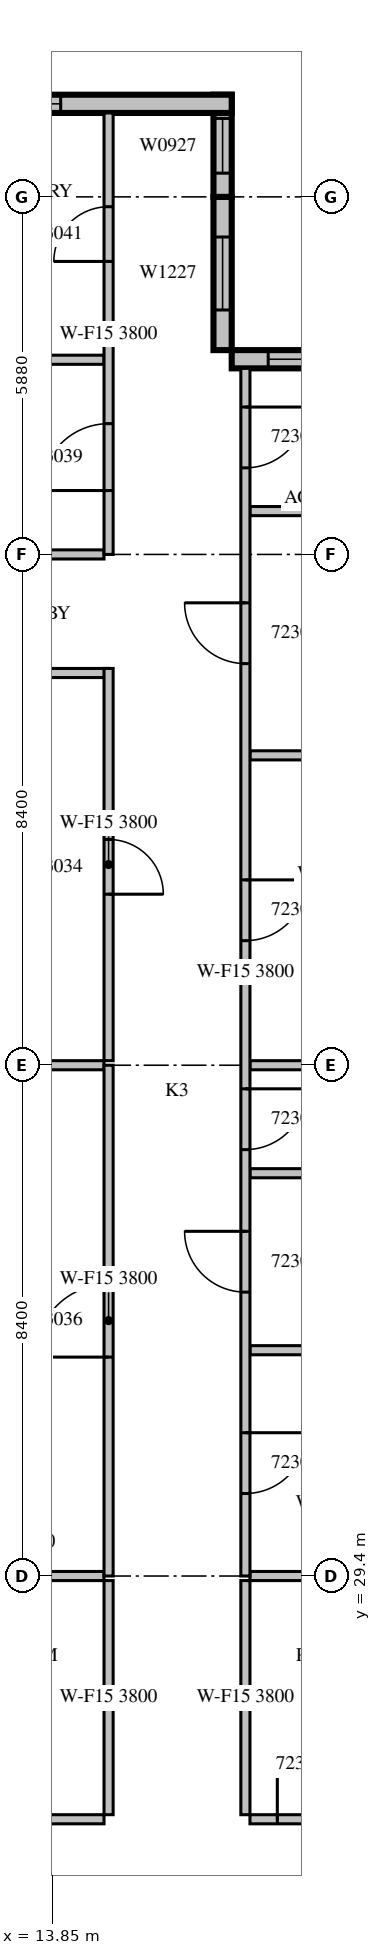
"""IFC4 building model, lengths in metres.
Left out: names, types, materials, properties, quantities, classifications, styles, units other than length and angle.
Written with IfcOpenShell. Run it as: python <this file> out.ifc"""

import sys

from ifc_helpers import new_model, si_unit, direction, frame, frame_2d, origin, place, context, subcontext, project, spatial, rectangle, extrude, source, transform, mapped, element, fill, save


model = new_model("IFC4")
c1 = context("Model", 3, precision=1e-05, world=origin(), true_north=direction((0.0, 1.0)))
c2 = subcontext(c1, "Body", "Model", "MODEL_VIEW")
j1 = project(units=[si_unit("LENGTHUNIT", "METRE"), si_unit("PLANEANGLEUNIT", "RADIAN")], contexts=[c1])
p1 = place(None, origin())
s1 = spatial("IfcSite", under=j1, at=p1, CompositionType="ELEMENT")
p2 = place(p1, origin())
s2 = spatial("IfcBuilding", under=s1, at=p2, CompositionType="ELEMENT")
p3 = place(p2, frame((0.0, 0.0, 107.7)))
s3 = spatial("IfcBuildingStorey", under=s2, at=p3, CompositionType="ELEMENT", Elevation=107.7)
m1 = source(origin(), c2, "Body", "SweptSolid", [
    extrude(rectangle(XDim=4.2, YDim=0.3, at=frame_2d((2.1, 0.0))), origin(), (0.0, 0.0, 1.0), 3.8),
])
p4 = place(p3, frame((21.0, 49.41, 0.0), z_axis=(0.0, 0.0, 1.0), x_axis=(-1.0, 0.0, 0.0)))
e1 = element("IfcWall", 1, at=p4, inside=s3, PredefinedType="STANDARD", context=c2, shape_type="MappedRepresentation", body=[
    mapped(m1, transform((0.0, 0.0, 0.0), scale=1.0)),
])
m2 = source(origin(), c2, "Body", "SweptSolid", [
    extrude(rectangle(XDim=3.0, YDim=2.7, at=frame_2d((1.5, 1.35))), frame((0.0, 0.16, 0.0), z_axis=(0.0, -1.0, 0.0), x_axis=(1.0, 0.0, 0.0)), (0.0, 0.0, 1.0), 0.32),
])
p5 = place(p4, frame((0.6, 0.0, 0.6)))
e2 = element("IfcOpeningElement", 2, at=p5, cuts=e1, PredefinedType="OPENING", context=c2, shape_type="MappedRepresentation", body=[
    mapped(m2, transform((0.0, 0.0, 0.0), scale=1.0)),
])
m3 = source(origin(), c2, "Body", "SweptSolid", [
    extrude(rectangle(XDim=2.52, YDim=0.3, at=frame_2d((1.26, 0.0))), origin(), (0.0, 0.0, 1.0), 3.8),
])
p6 = place(p3, frame((16.65, 49.56, 0.0), z_axis=(0.0, 0.0, 1.0), x_axis=(0.0, 1.0, 0.0)))
e3 = element("IfcWall", 3, at=p6, inside=s3, PredefinedType="STANDARD", context=c2, shape_type="MappedRepresentation", body=[
    mapped(m3, transform((0.0, 0.0, 0.0), scale=1.0)),
])
m4 = source(origin(), c2, "Body", "SweptSolid", [
    extrude(rectangle(XDim=1.2, YDim=2.7, at=frame_2d((0.6, 1.35))), frame((0.0, 0.16, 0.0), z_axis=(0.0, -1.0, 0.0), x_axis=(1.0, 0.0, 0.0)), (0.0, 0.0, 1.0), 0.32),
])
p7 = place(p6, frame((0.66, 0.0, 0.6)))
e4 = element("IfcOpeningElement", 4, at=p7, cuts=e3, PredefinedType="OPENING", context=c2, shape_type="MappedRepresentation", body=[
    mapped(m4, transform((0.0, 0.0, 0.0), scale=1.0)),
])
m5 = source(origin(), c2, "Body", "SweptSolid", [
    extrude(rectangle(XDim=1.68, YDim=0.3, at=frame_2d((0.84, 0.0))), origin(), (0.0, 0.0, 1.0), 3.8),
])
p8 = place(p3, frame((16.65, 52.08, 0.0), z_axis=(0.0, 0.0, 1.0), x_axis=(0.0, 1.0, 0.0)))
e5 = element("IfcWall", 5, at=p8, inside=s3, PredefinedType="STANDARD", context=c2, shape_type="MappedRepresentation", body=[
    mapped(m5, transform((0.0, 0.0, 0.0), scale=1.0)),
])
m6 = source(origin(), c2, "Body", "SweptSolid", [
    extrude(rectangle(XDim=0.9, YDim=2.7, at=frame_2d((0.45, 1.35))), frame((0.0, 0.16, 0.0), z_axis=(0.0, -1.0, 0.0), x_axis=(1.0, 0.0, 0.0)), (0.0, 0.0, 1.0), 0.32),
])
p9 = place(p8, frame((0.39, 0.0, 0.6)))
e6 = element("IfcOpeningElement", 6, at=p9, cuts=e5, PredefinedType="OPENING", context=c2, shape_type="MappedRepresentation", body=[
    mapped(m6, transform((0.0, 0.0, 0.0), scale=1.0)),
])
m7 = source(origin(), c2, "Body", "SweptSolid", [
    extrude(rectangle(XDim=10.5, YDim=0.3, at=frame_2d((5.25, 0.0))), origin(), (0.0, 0.0, 1.0), 3.8),
])
p10 = place(p3, frame((16.8, 53.61, 0.0), z_axis=(0.0, 0.0, 1.0), x_axis=(-1.0, 0.0, 0.0)))
e7 = element("IfcWall", 7, at=p10, inside=s3, PredefinedType="STANDARD", context=c2, shape_type="MappedRepresentation", body=[
    mapped(m7, transform((0.0, 0.0, 0.0), scale=1.0)),
])
m8 = source(origin(), c2, "Body", "SweptSolid", [
    extrude(rectangle(XDim=1.8, YDim=2.7, at=frame_2d((0.9, 1.35))), frame((0.0, 0.16, 0.0), z_axis=(0.0, -1.0, 0.0), x_axis=(1.0, 0.0, 0.0)), (0.0, 0.0, 1.0), 0.32),
])
p11 = place(p10, frame((8.025, 0.0, 0.6)))
e8 = element("IfcOpeningElement", 8, at=p11, cuts=e7, PredefinedType="OPENING", context=c2, shape_type="MappedRepresentation", body=[
    mapped(m8, transform((0.0, 0.0, 0.0), scale=1.0)),
])
m9 = source(origin(), c2, "Body", "SweptSolid", [
    extrude(rectangle(XDim=2.4, YDim=2.7, at=frame_2d((1.2, 1.35))), frame((0.0, 0.16, 0.0), z_axis=(0.0, -1.0, 0.0), x_axis=(1.0, 0.0, 0.0)), (0.0, 0.0, 1.0), 0.32),
])
p12 = place(p10, frame((2.812, 0.0, 0.6)))
e9 = element("IfcOpeningElement", 9, at=p12, cuts=e7, PredefinedType="OPENING", context=c2, shape_type="MappedRepresentation", body=[
    mapped(m9, transform((0.0, 0.0, 0.0), scale=1.0)),
])
p13 = place(p3, frame((6.505, 25.4, 0.0), z_axis=(0.0, 0.0, 1.0), x_axis=(1.0, 0.0, 0.0)))
e10 = element("IfcWall", 10, at=p13, inside=s3, PredefinedType="PARTITIONING", context=c2, shape_type="SweptSolid", body=[
    extrude(rectangle(XDim=8.195, YDim=0.15, at=frame_2d((4.098, 0.0))), origin(), (0.0, 0.0, 1.0), 3.8),
])
m10 = source(origin(), c2, "Body", "SweptSolid", [
    extrude(rectangle(XDim=0.9, YDim=2.1, at=frame_2d((0.45, 1.05))), frame((0.0, 0.085, 0.0), z_axis=(0.0, -1.0, 0.0), x_axis=(1.0, 0.0, 0.0)), (0.0, 0.0, 1.0), 0.17),
])
p14 = place(p13, frame((1.045, 0.0, 0.0)))
e11 = element("IfcOpeningElement", 11, at=p14, cuts=e10, PredefinedType="OPENING", context=c2, shape_type="MappedRepresentation", body=[
    mapped(m10, transform((0.0, 0.0, 0.0), scale=1.0)),
])
p15 = place(p13, frame((5.97, 0.0, 0.0)))
e12 = element("IfcOpeningElement", 12, at=p15, cuts=e10, PredefinedType="OPENING", context=c2, shape_type="MappedRepresentation", body=[
    mapped(m10, transform((0.0, 0.0, 0.0), scale=1.0)),
])
m11 = source(origin(), c2, "Body", "SweptSolid", [
    extrude(rectangle(XDim=3.6, YDim=0.15, at=frame_2d((1.8, 0.0))), origin(), (0.0, 0.0, 1.0), 3.8),
])
p16 = place(p3, frame((17.1, 25.4, 0.0), z_axis=(0.0, 0.0, 1.0), x_axis=(1.0, 0.0, 0.0)))
e13 = element("IfcWall", 13, at=p16, inside=s3, PredefinedType="PARTITIONING", context=c2, shape_type="MappedRepresentation", body=[
    mapped(m11, transform((0.0, 0.0, 0.0), scale=1.0)),
])
p17 = place(p16, frame((0.45, 0.0, 0.0)))
e14 = element("IfcOpeningElement", 14, at=p17, cuts=e13, PredefinedType="OPENING", context=c2, shape_type="MappedRepresentation", body=[
    mapped(m10, transform((0.0, 0.0, 0.0), scale=1.0)),
])
m12 = source(origin(), c2, "Body", "SweptSolid", [
    extrude(rectangle(XDim=3.85, YDim=0.15, at=frame_2d((1.925, 0.0))), origin(), (0.0, 0.0, 1.0), 3.8),
])
for number, where, z_axis, x_axis in (
    (15, (14.775, 25.475, 0.0), (0.0, 0.0, 1.0), (0.0, 1.0, 0.0)),
    (16, (17.025, 29.325, 0.0), (0.0, 0.0, 1.0), (0.0, -1.0, 0.0)),
):
    element("IfcWall", number, at=place(p3, frame(where, z_axis=z_axis, x_axis=x_axis)), inside=s3, PredefinedType="PARTITIONING", context=c2, shape_type="MappedRepresentation", body=[
        mapped(m12, transform((0.0, 0.0, 0.0), scale=1.0)),
    ])
m13 = source(origin(), c2, "Body", "SweptSolid", [
    extrude(rectangle(XDim=3.676, YDim=0.15, at=frame_2d((1.838, 0.0))), origin(), (0.0, 0.0, 1.0), 3.8),
])
p18 = place(p3, frame((14.7, 29.4, 0.0), z_axis=(0.0, 0.0, 1.0), x_axis=(-1.0, 0.0, 0.0)))
e17 = element("IfcWall", 17, at=p18, inside=s3, PredefinedType="PARTITIONING", context=c2, shape_type="MappedRepresentation", body=[
    mapped(m13, transform((0.0, 0.0, 0.0), scale=1.0)),
])
m14 = source(origin(), c2, "Body", "SweptSolid", [
    extrude(rectangle(XDim=2.851, YDim=0.15, at=frame_2d((1.425, 0.0))), origin(), (0.0, 0.0, 1.0), 3.8),
])
p19 = place(p3, frame((19.951, 29.4, 0.0), z_axis=(0.0, 0.0, 1.0), x_axis=(-1.0, 0.0, 0.0)))
e18 = element("IfcWall", 18, at=p19, inside=s3, PredefinedType="PARTITIONING", context=c2, shape_type="MappedRepresentation", body=[
    mapped(m14, transform((0.0, 0.0, 0.0), scale=1.0)),
])
m15 = source(origin(), c2, "Body", "SweptSolid", [
    extrude(rectangle(XDim=3.275, YDim=0.15, at=frame_2d((1.637, 0.0))), origin(), (0.0, 0.0, 1.0), 3.8),
])
p20 = place(p3, frame((14.775, 44.25, 0.0), z_axis=(0.0, 0.0, 1.0), x_axis=(-1.0, 0.0, 0.0)))
e19 = element("IfcWall", 19, at=p20, inside=s3, PredefinedType="PARTITIONING", context=c2, shape_type="MappedRepresentation", body=[
    mapped(m15, transform((0.0, 0.0, 0.0), scale=1.0)),
])
m16 = source(origin(), c2, "Body", "SweptSolid", [
    extrude(rectangle(XDim=6.45, YDim=0.15, at=frame_2d((3.225, 0.0))), origin(), (0.0, 0.0, 1.0), 3.8),
])
p21 = place(p3, frame((14.775, 37.875, 0.0), z_axis=(0.0, 0.0, 1.0), x_axis=(0.0, 1.0, 0.0)))
e20 = element("IfcWall", 20, at=p21, inside=s3, PredefinedType="PARTITIONING", context=c2, shape_type="MappedRepresentation", body=[
    mapped(m16, transform((0.0, 0.0, 0.0), scale=1.0)),
])
p22 = place(p21, frame((2.737, 0.0, 0.0)))
e21 = element("IfcOpeningElement", 21, at=p22, cuts=e20, PredefinedType="OPENING", context=c2, shape_type="MappedRepresentation", body=[
    mapped(m10, transform((0.0, 0.0, 0.0), scale=1.0)),
])
m17 = source(origin(), c2, "Body", "SweptSolid", [
    extrude(rectangle(XDim=3.525, YDim=0.15, at=frame_2d((1.762, 0.0))), origin(), (0.0, 0.0, 1.0), 3.8),
])
for number, where, z_axis, x_axis in (
    (22, (14.7, 37.8, 0.0), (0.0, 0.0, 1.0), (-1.0, 0.0, 0.0)),
    (23, (14.7, 49.401, 0.0), (0.0, 0.0, 1.0), (-1.0, 0.0, 0.0)),
    (24, (14.7, 46.2, 0.0), (0.0, 0.0, 1.0), (-1.0, 0.0, 0.0)),
):
    element("IfcWall", number, at=place(p3, frame(where, z_axis=z_axis, x_axis=x_axis)), inside=s3, PredefinedType="PARTITIONING", context=c2, shape_type="MappedRepresentation", body=[
        mapped(m17, transform((0.0, 0.0, 0.0), scale=1.0)),
    ])
for number, where, z_axis, x_axis in (
    (25, (17.1, 33.113, 0.0), (0.0, 0.0, 1.0), (1.0, 0.0, 0.0)),
    (26, (17.1, 36.024, 0.0), (0.0, 0.0, 1.0), (1.0, 0.0, 0.0)),
    (27, (17.1, 42.896, 0.0), (0.0, 0.0, 1.0), (1.0, 0.0, 0.0)),
    (28, (17.1, 46.913, 0.0), (0.0, 0.0, 1.0), (1.0, 0.0, 0.0)),
):
    element("IfcWall", number, at=place(p3, frame(where, z_axis=z_axis, x_axis=x_axis)), inside=s3, PredefinedType="PARTITIONING", context=c2, shape_type="MappedRepresentation", body=[
        mapped(m11, transform((0.0, 0.0, 0.0), scale=1.0)),
    ])
p23 = place(p3, frame((19.951, 37.8, 0.0), z_axis=(0.0, 0.0, 1.0), x_axis=(-1.0, 0.0, 0.0)))
e29 = element("IfcWall", 29, at=p23, inside=s3, PredefinedType="PARTITIONING", context=c2, shape_type="MappedRepresentation", body=[
    mapped(m14, transform((0.0, 0.0, 0.0), scale=1.0)),
])
m18 = source(origin(), c2, "Body", "SweptSolid", [
    extrude(rectangle(XDim=8.4, YDim=0.15, at=frame_2d((4.2, 0.0))), origin(), (0.0, 0.0, 1.0), 3.8),
])
p24 = place(p3, frame((14.775, 29.4, 0.0), z_axis=(0.0, 0.0, 1.0), x_axis=(0.0, 1.0, 0.0)))
e30 = element("IfcWall", 30, at=p24, inside=s3, PredefinedType="PARTITIONING", context=c2, shape_type="MappedRepresentation", body=[
    mapped(m18, transform((0.0, 0.0, 0.0), scale=1.0)),
])
m19 = source(origin(), c2, "Body", "SweptSolid", [
    extrude(rectangle(XDim=1.2, YDim=2.1, at=frame_2d((0.6, 1.05))), frame((0.0, 0.085, 0.0), z_axis=(0.0, -1.0, 0.0), x_axis=(1.0, 0.0, 0.0)), (0.0, 0.0, 1.0), 0.17),
])
p25 = place(p24, frame((3.6, 0.0, 0.0)))
e31 = element("IfcOpeningElement", 31, at=p25, cuts=e30, PredefinedType="OPENING", context=c2, shape_type="MappedRepresentation", body=[
    mapped(m19, transform((0.0, 0.0, 0.0), scale=1.0)),
])
m20 = source(origin(), c2, "Body", "SweptSolid", [
    extrude(rectangle(XDim=7.26, YDim=0.15, at=frame_2d((3.63, 0.0))), origin(), (0.0, 0.0, 1.0), 3.8),
])
p26 = place(p3, frame((14.775, 46.2, 0.0), z_axis=(0.0, 0.0, 1.0), x_axis=(0.0, 1.0, 0.0)))
e32 = element("IfcWall", 32, at=p26, inside=s3, PredefinedType="PARTITIONING", context=c2, shape_type="MappedRepresentation", body=[
    mapped(m20, transform((0.0, 0.0, 0.0), scale=1.0)),
])
m21 = source(origin(), c2, "Body", "SweptSolid", [
    extrude(rectangle(XDim=1.1, YDim=2.1, at=frame_2d((0.55, 1.05))), frame((0.0, 0.085, 0.0), z_axis=(0.0, -1.0, 0.0), x_axis=(1.0, 0.0, 0.0)), (0.0, 0.0, 1.0), 0.17),
])
p27 = place(p26, frame((1.051, 0.0, 0.0)))
e33 = element("IfcOpeningElement", 33, at=p27, cuts=e32, PredefinedType="OPENING", context=c2, shape_type="MappedRepresentation", body=[
    mapped(m21, transform((0.0, 0.0, 0.0), scale=1.0)),
])
p28 = place(p26, frame((4.818, 0.0, 0.0)))
e34 = element("IfcOpeningElement", 34, at=p28, cuts=e32, PredefinedType="OPENING", context=c2, shape_type="MappedRepresentation", body=[
    mapped(m10, transform((0.0, 0.0, 0.0), scale=1.0)),
])
m22 = source(origin(), c2, "Body", "SweptSolid", [
    extrude(rectangle(XDim=19.86, YDim=0.15, at=frame_2d((9.93, 0.0))), origin(), (0.0, 0.0, 1.0), 3.8),
])
p29 = place(p3, frame((17.025, 49.26, 0.0), z_axis=(0.0, 0.0, 1.0), x_axis=(0.0, -1.0, 0.0)))
e35 = element("IfcWall", 35, at=p29, inside=s3, PredefinedType="PARTITIONING", context=c2, shape_type="MappedRepresentation", body=[
    mapped(m22, transform((0.0, 0.0, 0.0), scale=1.0)),
])
m23 = source(origin(), c2, "Body", "SweptSolid", [
    extrude(rectangle(XDim=1.0, YDim=2.1, at=frame_2d((0.5, 1.05))), frame((0.0, 0.085, 0.0), z_axis=(0.0, -1.0, 0.0), x_axis=(1.0, 0.0, 0.0)), (0.0, 0.0, 1.0), 0.17),
])
p30 = place(p29, frame((17.503, 0.0, 0.0)))
e36 = element("IfcOpeningElement", 36, at=p30, cuts=e35, PredefinedType="OPENING", context=c2, shape_type="MappedRepresentation", body=[
    mapped(m23, transform((0.0, 0.0, 0.0), scale=1.0)),
])
p31 = place(p29, frame((14.191, 0.0, 0.0)))
e37 = element("IfcOpeningElement", 37, at=p31, cuts=e35, PredefinedType="OPENING", context=c2, shape_type="MappedRepresentation", body=[
    mapped(m23, transform((0.0, 0.0, 0.0), scale=1.0)),
])
p32 = place(p29, frame((11.848, 0.0, 0.0)))
e38 = element("IfcOpeningElement", 38, at=p32, cuts=e35, PredefinedType="OPENING", context=c2, shape_type="MappedRepresentation", body=[
    mapped(m23, transform((0.0, 0.0, 0.0), scale=1.0)),
])
p33 = place(p29, frame((8.412, 0.0, 0.0)))
e39 = element("IfcOpeningElement", 39, at=p33, cuts=e35, PredefinedType="OPENING", context=c2, shape_type="MappedRepresentation", body=[
    mapped(m23, transform((0.0, 0.0, 0.0), scale=1.0)),
])
p34 = place(p29, frame((3.856, 0.0, 0.0)))
e40 = element("IfcOpeningElement", 40, at=p34, cuts=e35, PredefinedType="OPENING", context=c2, shape_type="MappedRepresentation", body=[
    mapped(m23, transform((0.0, 0.0, 0.0), scale=1.0)),
])
p35 = place(p29, frame((0.636, 0.0, 0.0)))
e41 = element("IfcOpeningElement", 41, at=p35, cuts=e35, PredefinedType="OPENING", context=c2, shape_type="MappedRepresentation", body=[
    mapped(m23, transform((0.0, 0.0, 0.0), scale=1.0)),
])
m24 = source(origin(), c2, "Body", "SweptSolid", [
    extrude(rectangle(XDim=3.0, YDim=2.7, at=frame_2d((1.5, 1.35))), frame((0.0, 0.03, 0.0), z_axis=(0.0, -1.0, 0.0), x_axis=(1.0, 0.0, 0.0)), (0.0, 0.0, 1.0), 0.06),
])
p36 = place(p5, origin())
e42 = element("IfcWindow", 42, at=p36, inside=s3, PartitioningType="SINGLE_PANEL", PredefinedType="WINDOW", context=c2, shape_type="MappedRepresentation", body=[
    mapped(m24, transform((0.0, 0.0, 0.0), scale=1.0)),
])
fill(e2, e42)
m25 = source(origin(), c2, "Body", "SweptSolid", [
    extrude(rectangle(XDim=1.2, YDim=2.7, at=frame_2d((0.6, 1.35))), frame((0.0, 0.03, 0.0), z_axis=(0.0, -1.0, 0.0), x_axis=(1.0, 0.0, 0.0)), (0.0, 0.0, 1.0), 0.06),
])
p37 = place(p7, origin())
e43 = element("IfcWindow", 43, at=p37, inside=s3, PartitioningType="SINGLE_PANEL", PredefinedType="WINDOW", context=c2, shape_type="MappedRepresentation", body=[
    mapped(m25, transform((0.0, 0.0, 0.0), scale=1.0)),
])
fill(e4, e43)
m26 = source(origin(), c2, "Body", "SweptSolid", [
    extrude(rectangle(XDim=0.9, YDim=2.7, at=frame_2d((0.45, 1.35))), frame((0.0, 0.03, 0.0), z_axis=(0.0, -1.0, 0.0), x_axis=(1.0, 0.0, 0.0)), (0.0, 0.0, 1.0), 0.06),
])
p38 = place(p9, origin())
e44 = element("IfcWindow", 44, at=p38, inside=s3, PartitioningType="SINGLE_PANEL", PredefinedType="WINDOW", context=c2, shape_type="MappedRepresentation", body=[
    mapped(m26, transform((0.0, 0.0, 0.0), scale=1.0)),
])
fill(e6, e44)
m27 = source(origin(), c2, "Body", "SweptSolid", [
    extrude(rectangle(XDim=2.4, YDim=2.7, at=frame_2d((1.2, 1.35))), frame((0.0, 0.03, 0.0), z_axis=(0.0, -1.0, 0.0), x_axis=(1.0, 0.0, 0.0)), (0.0, 0.0, 1.0), 0.06),
])
p39 = place(p12, origin())
e45 = element("IfcWindow", 45, at=p39, inside=s3, PartitioningType="SINGLE_PANEL", PredefinedType="WINDOW", context=c2, shape_type="MappedRepresentation", body=[
    mapped(m27, transform((0.0, 0.0, 0.0), scale=1.0)),
])
fill(e9, e45)
m28 = source(origin(), c2, "Body", "SweptSolid", [
    extrude(rectangle(XDim=0.9, YDim=2.1, at=frame_2d((0.45, 1.05))), frame((0.0, 0.025, 0.0), z_axis=(0.0, -1.0, 0.0), x_axis=(1.0, 0.0, 0.0)), (0.0, 0.0, 1.0), 0.05),
])
p40 = place(p17, origin())
e46 = element("IfcDoor", 46, at=p40, inside=s3, OperationType="SINGLE_SWING_LEFT", PredefinedType="DOOR", context=c2, shape_type="MappedRepresentation", body=[
    mapped(m28, transform((0.0, 0.0, 0.0), scale=1.0)),
])
fill(e14, e46)
p41 = place(p22, origin())
e47 = element("IfcDoor", 47, at=p41, inside=s3, OperationType="SINGLE_SWING_RIGHT", PredefinedType="DOOR", context=c2, shape_type="MappedRepresentation", body=[
    mapped(m28, transform((0.0, 0.0, 0.0), scale=1.0)),
])
fill(e21, e47)
m29 = source(origin(), c2, "Body", "SweptSolid", [
    extrude(rectangle(XDim=1.2, YDim=2.1, at=frame_2d((0.6, 1.05))), frame((0.0, 0.025, 0.0), z_axis=(0.0, -1.0, 0.0), x_axis=(1.0, 0.0, 0.0)), (0.0, 0.0, 1.0), 0.05),
])
p42 = place(p25, origin())
e48 = element("IfcDoor", 48, at=p42, inside=s3, OperationType="SINGLE_SWING_LEFT", PredefinedType="DOOR", context=c2, shape_type="MappedRepresentation", body=[
    mapped(m29, transform((0.0, 0.0, 0.0), scale=1.0)),
])
fill(e31, e48)
m30 = source(origin(), c2, "Body", "SweptSolid", [
    extrude(rectangle(XDim=1.1, YDim=2.1, at=frame_2d((0.55, 1.05))), frame((0.0, 0.025, 0.0), z_axis=(0.0, -1.0, 0.0), x_axis=(1.0, 0.0, 0.0)), (0.0, 0.0, 1.0), 0.05),
])
p43 = place(p27, origin())
e49 = element("IfcDoor", 49, at=p43, inside=s3, OperationType="SINGLE_SWING_LEFT", PredefinedType="DOOR", context=c2, shape_type="MappedRepresentation", body=[
    mapped(m30, transform((0.0, 0.0, 0.0), scale=1.0)),
])
fill(e33, e49)
p44 = place(p28, origin())
e50 = element("IfcDoor", 50, at=p44, inside=s3, OperationType="SINGLE_SWING_LEFT", PredefinedType="DOOR", context=c2, shape_type="MappedRepresentation", body=[
    mapped(m28, transform((0.0, 0.0, 0.0), scale=1.0)),
])
fill(e34, e50)
m31 = source(origin(), c2, "Body", "SweptSolid", [
    extrude(rectangle(XDim=1.0, YDim=2.1, at=frame_2d((0.5, 1.05))), frame((0.0, 0.025, 0.0), z_axis=(0.0, -1.0, 0.0), x_axis=(1.0, 0.0, 0.0)), (0.0, 0.0, 1.0), 0.05),
])
p45 = place(p30, origin())
e51 = element("IfcDoor", 51, at=p45, inside=s3, OperationType="SINGLE_SWING_LEFT", PredefinedType="DOOR", context=c2, shape_type="MappedRepresentation", body=[
    mapped(m31, transform((0.0, 0.0, 0.0), scale=1.0)),
])
fill(e36, e51)
p46 = place(p31, origin())
e52 = element("IfcDoor", 52, at=p46, inside=s3, OperationType="SINGLE_SWING_RIGHT", PredefinedType="DOOR", context=c2, shape_type="MappedRepresentation", body=[
    mapped(m31, transform((0.0, 0.0, 0.0), scale=1.0)),
])
fill(e37, e52)
p47 = place(p32, origin())
e53 = element("IfcDoor", 53, at=p47, inside=s3, OperationType="SINGLE_SWING_LEFT", PredefinedType="DOOR", context=c2, shape_type="MappedRepresentation", body=[
    mapped(m31, transform((0.0, 0.0, 0.0), scale=1.0)),
])
fill(e38, e53)
p48 = place(p33, origin())
e54 = element("IfcDoor", 54, at=p48, inside=s3, OperationType="SINGLE_SWING_LEFT", PredefinedType="DOOR", context=c2, shape_type="MappedRepresentation", body=[
    mapped(m31, transform((0.0, 0.0, 0.0), scale=1.0)),
])
fill(e39, e54)
p49 = place(p34, origin())
e55 = element("IfcDoor", 55, at=p49, inside=s3, OperationType="SINGLE_SWING_RIGHT", PredefinedType="DOOR", context=c2, shape_type="MappedRepresentation", body=[
    mapped(m31, transform((0.0, 0.0, 0.0), scale=1.0)),
])
fill(e40, e55)
p50 = place(p35, origin())
e56 = element("IfcDoor", 56, at=p50, inside=s3, OperationType="SINGLE_SWING_LEFT", PredefinedType="DOOR", context=c2, shape_type="MappedRepresentation", body=[
    mapped(m31, transform((0.0, 0.0, 0.0), scale=1.0)),
])
fill(e41, e56)
save(model, sys.argv[1])
